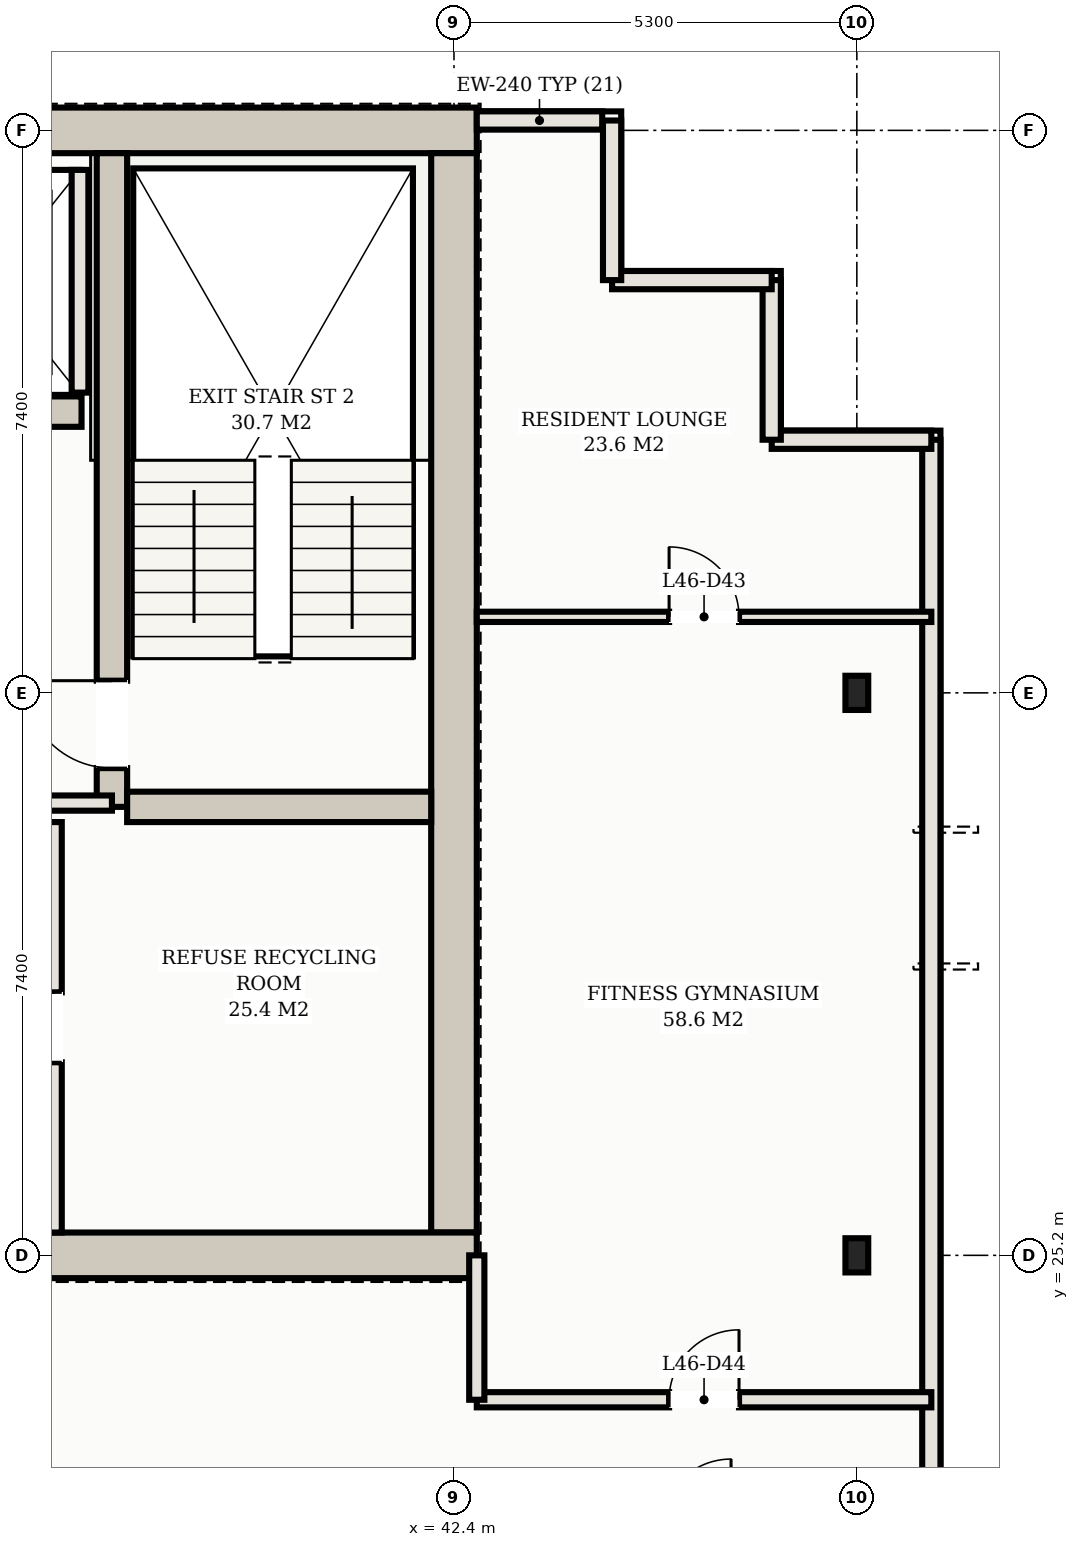
"""IFC4 building model, lengths in metres.
Left out: names, types, materials, properties, quantities, classifications, styles, units other than length and angle.
Written with IfcOpenShell. Run it as: python <this file> out.ifc"""

import sys

from ifc_helpers import new_model, si_unit, direction, frame, frame_2d, origin, origin_2d, place, context, subcontext, project, spatial, rectangle, hollow_rectangle, extrude, element, fill, save


model = new_model("IFC4")
c1 = context("Model", 3, precision=1e-05, world=origin(), true_north=direction((0.0, 1.0)))
c2 = subcontext(c1, "Body", "Model", "MODEL_VIEW")
j1 = project(units=[si_unit("LENGTHUNIT", "METRE"), si_unit("PLANEANGLEUNIT", "RADIAN")], contexts=[c1])
p1 = place(None, origin())
s1 = spatial("IfcSite", under=j1, at=p1, CompositionType="ELEMENT")
p2 = place(p1, origin())
s2 = spatial("IfcBuilding", under=s1, at=p2, CompositionType="ELEMENT")
p3 = place(p2, frame((0.0, 0.0, 168.9)))
s3 = spatial("IfcBuildingStorey", under=s2, at=p3, CompositionType="ELEMENT", Elevation=168.9)
p4 = place(p3, frame((10.3, 40.0, 0.0), z_axis=(0.0, 0.0, 1.0), x_axis=(1.0, 0.0, 0.0)))
e1 = element("IfcWall", 1, at=p4, inside=s3, PredefinedType="SHEAR", context=c2, shape_type="SweptSolid", body=[
    extrude(rectangle(XDim=32.4, YDim=0.6, at=frame_2d((16.2, 0.0))), origin(), (0.0, 0.0, 1.0), 3.1),
])
p5 = place(p3, frame((42.4, 25.5, 0.0), z_axis=(0.0, 0.0, 1.0), x_axis=(0.0, 1.0, 0.0)))
e2 = element("IfcWall", 2, at=p5, inside=s3, PredefinedType="SHEAR", context=c2, shape_type="SweptSolid", body=[
    extrude(rectangle(XDim=14.2, YDim=0.6, at=frame_2d((7.1, 0.0))), origin(), (0.0, 0.0, 1.0), 3.1),
])
p6 = place(p3, frame((34.6, 25.2, 0.0), z_axis=(0.0, 0.0, 1.0), x_axis=(1.0, 0.0, 0.0)))
e3 = element("IfcWall", 3, at=p6, inside=s3, PredefinedType="SHEAR", context=c2, shape_type="SweptSolid", body=[
    extrude(rectangle(XDim=8.1, YDim=0.6, at=frame_2d((4.05, 0.0))), origin(), (0.0, 0.0, 1.0), 3.1),
])
p7 = place(p6, frame((0.65, 0.0, 0.0)))
e4 = element("IfcOpeningElement", 4, at=p7, cuts=e3, PredefinedType="OPENING", context=c2, shape_type="SweptSolid", body=[
    extrude(rectangle(XDim=1.25, YDim=2.2, at=frame_2d((0.625, 1.1))), frame((0.0, 0.31, 0.0), z_axis=(0.0, -1.0, 0.0), x_axis=(1.0, 0.0, 0.0)), (0.0, 0.0, 1.0), 0.62),
])
p8 = place(p3, frame((37.9, 31.1, 0.0), z_axis=(0.0, 0.0, 1.0), x_axis=(0.0, 1.0, 0.0)))
e5 = element("IfcWall", 5, at=p8, inside=s3, PredefinedType="SHEAR", context=c2, shape_type="SweptSolid", body=[
    extrude(rectangle(XDim=8.6, YDim=0.4, at=frame_2d((4.3, 0.0))), origin(), (0.0, 0.0, 1.0), 3.1),
])
p9 = place(p8, frame((0.51, 0.0, 0.0)))
e6 = element("IfcOpeningElement", 6, at=p9, cuts=e5, PredefinedType="OPENING", context=c2, shape_type="SweptSolid", body=[
    extrude(rectangle(XDim=1.15, YDim=2.2, at=frame_2d((0.575, 1.1))), frame((0.0, 0.21, 0.0), z_axis=(0.0, -1.0, 0.0), x_axis=(1.0, 0.0, 0.0)), (0.0, 0.0, 1.0), 0.42),
])
p10 = place(p3, frame((38.1, 31.1, 0.0), z_axis=(0.0, 0.0, 1.0), x_axis=(1.0, 0.0, 0.0)))
e7 = element("IfcWall", 7, at=p10, inside=s3, PredefinedType="SHEAR", context=c2, shape_type="SweptSolid", body=[
    extrude(rectangle(XDim=4.0, YDim=0.4, at=frame_2d((2.0, 0.0))), origin(), (0.0, 0.0, 1.0), 3.1),
])
p11 = place(p3, frame((15.5, 36.3, 0.0), z_axis=(0.0, 0.0, 1.0), x_axis=(1.0, 0.0, 0.0)))
e8 = element("IfcWall", 8, at=p11, inside=s3, PredefinedType="SHEAR", context=c2, shape_type="SweptSolid", body=[
    extrude(rectangle(XDim=22.0, YDim=0.4, at=frame_2d((11.0, 0.0))), origin(), (0.0, 0.0, 1.0), 3.1),
])
p12 = place(p11, frame((0.65, 0.0, 0.0)))
e9 = element("IfcOpeningElement", 9, at=p12, cuts=e8, PredefinedType="OPENING", context=c2, shape_type="SweptSolid", body=[
    extrude(rectangle(XDim=1.1, YDim=2.15, at=frame_2d((0.55, 1.075))), frame((0.0, 0.21, 0.0), z_axis=(0.0, -1.0, 0.0), x_axis=(1.0, 0.0, 0.0)), (0.0, 0.0, 1.0), 0.42),
])
p13 = place(p11, frame((20.25, 0.0, 0.0)))
e10 = element("IfcOpeningElement", 10, at=p13, cuts=e8, PredefinedType="OPENING", context=c2, shape_type="SweptSolid", body=[
    extrude(rectangle(XDim=1.1, YDim=2.15, at=frame_2d((0.55, 1.075))), frame((0.0, 0.21, 0.0), z_axis=(0.0, -1.0, 0.0), x_axis=(1.0, 0.0, 0.0)), (0.0, 0.0, 1.0), 0.42),
])
p14 = place(p11, frame((17.05, 0.0, 0.0)))
e11 = element("IfcOpeningElement", 11, at=p14, cuts=e8, PredefinedType="OPENING", context=c2, shape_type="SweptSolid", body=[
    extrude(rectangle(XDim=1.3, YDim=2.2, at=frame_2d((0.65, 1.1))), frame((0.0, 0.21, 0.0), z_axis=(0.0, -1.0, 0.0), x_axis=(1.0, 0.0, 0.0)), (0.0, 0.0, 1.0), 0.42),
])
for number, where, z_axis, x_axis in (
    (12, (47.7, 25.2, 0.0), (0.0, 0.0, 1.0), (1.0, 0.0, 0.0)),
    (13, (47.7, 32.6, 0.0), (0.0, 0.0, 1.0), (1.0, 0.0, 0.0)),
):
    element("IfcColumn", number, at=place(p3, frame(where, z_axis=z_axis, x_axis=x_axis)), inside=s3, PredefinedType="COLUMN", context=c2, shape_type="SweptSolid", body=[
        extrude(hollow_rectangle(XDim=0.3, YDim=0.45, WallThickness=0.016, at=origin_2d()), origin(), (0.0, 0.0, 1.0), 3.3),
    ])
p15 = place(p3, frame((37.48, 36.55, 0.0), z_axis=(0.0, 0.0, 1.0), x_axis=(0.0, 1.0, 0.0)))
e14 = element("IfcWall", 14, at=p15, inside=s3, PredefinedType="SOLIDWALL", context=c2, shape_type="SweptSolid", body=[
    extrude(rectangle(XDim=2.93, YDim=0.22, at=frame_2d((1.465, 0.0))), origin(), (0.0, 0.0, 1.0), 3.1),
])
p16 = place(p3, frame((48.68, 8.52, 0.0), z_axis=(0.0, 0.0, 1.0), x_axis=(0.0, 1.0, 0.0)))
e15 = element("IfcWall", 15, at=p16, inside=s3, PredefinedType="SOLIDWALL", context=c2, shape_type="SweptSolid", body=[
    extrude(rectangle(XDim=27.41, YDim=0.24, at=frame_2d((13.705, 0.0))), origin(), (0.0, 0.0, 1.0), 3.1),
])
p17 = place(p16, frame((8.48, 0.0, 0.0)))
e16 = element("IfcOpeningElement", 16, at=p17, cuts=e15, PredefinedType="OPENING", context=c2, shape_type="SweptSolid", body=[
    extrude(rectangle(XDim=1.8, YDim=2.2, at=frame_2d((0.9, 1.1))), frame((0.0, 0.13, 0.0), z_axis=(0.0, -1.0, 0.0), x_axis=(1.0, 0.0, 0.0)), (0.0, 0.0, 1.0), 0.26),
])
p18 = place(p3, frame((48.68, 35.93, 0.0), z_axis=(0.0, 0.0, 1.0), x_axis=(-1.0, 0.0, 0.0)))
e17 = element("IfcWall", 17, at=p18, inside=s3, PredefinedType="SOLIDWALL", context=c2, shape_type="SweptSolid", body=[
    extrude(rectangle(XDim=2.1, YDim=0.24, at=frame_2d((1.05, 0.0))), origin(), (0.0, 0.0, 1.0), 3.1),
])
for number, where, z_axis, x_axis in (
    (18, (46.58, 35.93, 0.0), (0.0, 0.0, 1.0), (0.0, 1.0, 0.0)),
    (19, (46.58, 38.03, 0.0), (0.0, 0.0, 1.0), (-1.0, 0.0, 0.0)),
):
    element("IfcWall", number, at=place(p3, frame(where, z_axis=z_axis, x_axis=x_axis)), inside=s3, PredefinedType="SOLIDWALL", context=c2, shape_type="SweptSolid", body=[
        extrude(rectangle(XDim=2.1, YDim=0.24, at=frame_2d((1.05, 0.0))), origin(), (0.0, 0.0, 1.0), 3.1),
    ])
p19 = place(p3, frame((44.48, 38.03, 0.0), z_axis=(0.0, 0.0, 1.0), x_axis=(0.0, 1.0, 0.0)))
e20 = element("IfcWall", 20, at=p19, inside=s3, PredefinedType="SOLIDWALL", context=c2, shape_type="SweptSolid", body=[
    extrude(rectangle(XDim=2.1, YDim=0.24, at=frame_2d((1.05, 0.0))), origin(), (0.0, 0.0, 1.0), 3.1),
])
p20 = place(p3, frame((44.35, 40.13, 0.0), z_axis=(0.0, 0.0, 1.0), x_axis=(-1.0, 0.0, 0.0)))
e21 = element("IfcWall", 21, at=p20, inside=s3, PredefinedType="SOLIDWALL", context=c2, shape_type="SweptSolid", body=[
    extrude(rectangle(XDim=1.65, YDim=0.24, at=frame_2d((0.825, 0.0))), origin(), (0.0, 0.0, 1.0), 3.1),
])
p21 = place(p3, frame((34.65, 31.15, 0.0), z_axis=(0.0, 0.0, 1.0), x_axis=(1.0, 0.0, 0.0)))
e22 = element("IfcWall", 22, at=p21, inside=s3, PredefinedType="PARTITIONING", context=c2, shape_type="SweptSolid", body=[
    extrude(rectangle(XDim=3.25, YDim=0.2, at=frame_2d((1.625, 0.0))), origin(), (0.0, 0.0, 1.0), 2.38),
])
p22 = place(p21, frame((0.725, 0.0, 0.0)))
e23 = element("IfcOpeningElement", 23, at=p22, cuts=e22, PredefinedType="OPENING", context=c2, shape_type="SweptSolid", body=[
    extrude(rectangle(XDim=1.25, YDim=2.2, at=frame_2d((0.625, 1.1))), frame((0.0, 0.11, 0.0), z_axis=(0.0, -1.0, 0.0), x_axis=(1.0, 0.0, 0.0)), (0.0, 0.0, 1.0), 0.22),
])
p23 = place(p3, frame((37.15, 25.5, 0.0), z_axis=(0.0, 0.0, 1.0), x_axis=(0.0, 1.0, 0.0)))
e24 = element("IfcWall", 24, at=p23, inside=s3, PredefinedType="PARTITIONING", context=c2, shape_type="SweptSolid", body=[
    extrude(rectangle(XDim=5.4, YDim=0.18, at=frame_2d((2.7, 0.0))), origin(), (0.0, 0.0, 1.0), 2.38),
])
p24 = place(p23, frame((2.24, 0.0, 0.0)))
e25 = element("IfcOpeningElement", 25, at=p24, cuts=e24, PredefinedType="OPENING", context=c2, shape_type="SweptSolid", body=[
    extrude(rectangle(XDim=0.92, YDim=2.15, at=frame_2d((0.46, 1.075))), frame((0.0, 0.1, 0.0), z_axis=(0.0, -1.0, 0.0), x_axis=(1.0, 0.0, 0.0)), (0.0, 0.0, 1.0), 0.2),
])
p25 = place(p3, frame((42.7, 23.3, 0.0), z_axis=(0.0, 0.0, 1.0), x_axis=(1.0, 0.0, 0.0)))
e26 = element("IfcWall", 26, at=p25, inside=s3, PredefinedType="PARTITIONING", context=c2, shape_type="SweptSolid", body=[
    extrude(rectangle(XDim=5.98, YDim=0.2, at=frame_2d((2.99, 0.0))), origin(), (0.0, 0.0, 1.0), 2.38),
])
p26 = place(p25, frame((2.53, 0.0, 0.0)))
e27 = element("IfcOpeningElement", 27, at=p26, cuts=e26, PredefinedType="OPENING", context=c2, shape_type="SweptSolid", body=[
    extrude(rectangle(XDim=0.92, YDim=2.15, at=frame_2d((0.46, 1.075))), frame((0.0, 0.11, 0.0), z_axis=(0.0, -1.0, 0.0), x_axis=(1.0, 0.0, 0.0)), (0.0, 0.0, 1.0), 0.22),
])
p27 = place(p3, frame((42.7, 23.3, 0.0), z_axis=(0.0, 0.0, 1.0), x_axis=(0.0, 1.0, 0.0)))
e28 = element("IfcWall", 28, at=p27, inside=s3, PredefinedType="PARTITIONING", context=c2, shape_type="SweptSolid", body=[
    extrude(rectangle(XDim=1.9, YDim=0.2, at=frame_2d((0.95, 0.0))), origin(), (0.0, 0.0, 1.0), 2.38),
])
p28 = place(p3, frame((42.7, 33.6, 0.0), z_axis=(0.0, 0.0, 1.0), x_axis=(1.0, 0.0, 0.0)))
e29 = element("IfcWall", 29, at=p28, inside=s3, PredefinedType="PARTITIONING", context=c2, shape_type="SweptSolid", body=[
    extrude(rectangle(XDim=5.98, YDim=0.135, at=frame_2d((2.99, 0.0))), origin(), (0.0, 0.0, 1.0), 2.38),
])
p29 = place(p28, frame((2.53, 0.0, 0.0)))
e30 = element("IfcOpeningElement", 30, at=p29, cuts=e29, PredefinedType="OPENING", context=c2, shape_type="SweptSolid", body=[
    extrude(rectangle(XDim=0.92, YDim=2.15, at=frame_2d((0.46, 1.075))), frame((0.0, 0.078, 0.0), z_axis=(0.0, -1.0, 0.0), x_axis=(1.0, 0.0, 0.0)), (0.0, 0.0, 1.0), 0.155),
])
p30 = place(p9, origin())
e31 = element("IfcDoor", 31, at=p30, inside=s3, OperationType="SINGLE_SWING_RIGHT", PredefinedType="DOOR", context=c2, shape_type="SweptSolid", body=[
    extrude(rectangle(XDim=1.15, YDim=2.2, at=frame_2d((0.575, 1.1))), frame((0.0, 0.025, 0.0), z_axis=(0.0, -1.0, 0.0), x_axis=(1.0, 0.0, 0.0)), (0.0, 0.0, 1.0), 0.05),
])
fill(e6, e31)
p31 = place(p24, origin())
e32 = element("IfcDoor", 32, at=p31, inside=s3, OperationType="SINGLE_SWING_RIGHT", PredefinedType="DOOR", context=c2, shape_type="SweptSolid", body=[
    extrude(rectangle(XDim=0.92, YDim=2.15, at=frame_2d((0.46, 1.075))), frame((0.0, 0.025, 0.0), z_axis=(0.0, -1.0, 0.0), x_axis=(1.0, 0.0, 0.0)), (0.0, 0.0, 1.0), 0.05),
])
fill(e25, e32)
p32 = place(p29, origin())
e33 = element("IfcDoor", 33, at=p32, inside=s3, OperationType="SINGLE_SWING_LEFT", PredefinedType="DOOR", context=c2, shape_type="SweptSolid", body=[
    extrude(rectangle(XDim=0.92, YDim=2.15, at=frame_2d((0.46, 1.075))), frame((0.0, 0.025, 0.0), z_axis=(0.0, -1.0, 0.0), x_axis=(1.0, 0.0, 0.0)), (0.0, 0.0, 1.0), 0.05),
])
fill(e30, e33)
p33 = place(p26, origin())
e34 = element("IfcDoor", 34, at=p33, inside=s3, OperationType="SINGLE_SWING_RIGHT", PredefinedType="DOOR", context=c2, shape_type="SweptSolid", body=[
    extrude(rectangle(XDim=0.92, YDim=2.15, at=frame_2d((0.46, 1.075))), frame((0.0, 0.025, 0.0), z_axis=(0.0, -1.0, 0.0), x_axis=(1.0, 0.0, 0.0)), (0.0, 0.0, 1.0), 0.05),
])
fill(e27, e34)
save(model, sys.argv[1])
